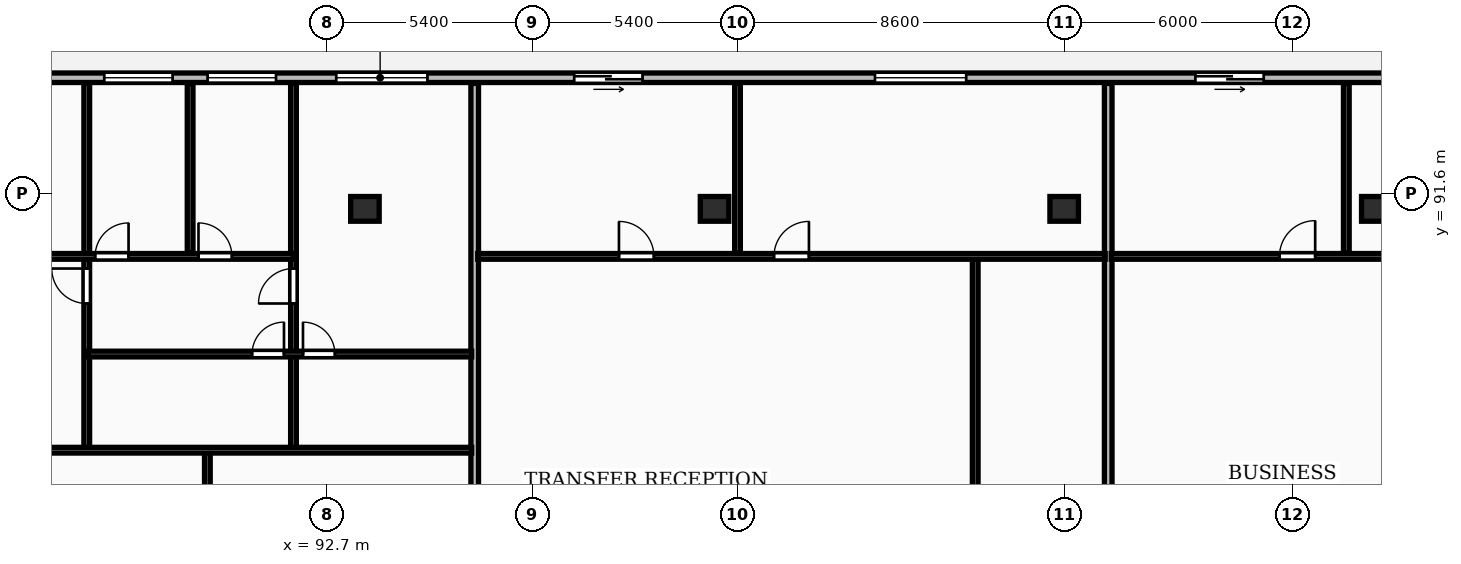
"""IFC4 building model, lengths in metres.
Left out: names, types, materials, properties, quantities, classifications, styles, units other than length and angle.
Written with IfcOpenShell. Run it as: python <this file> out.ifc"""

import sys

from ifc_helpers import new_model, si_unit, direction, frame, frame_2d, origin, origin_2d, place, context, subcontext, project, spatial, rectangle, extrude, element, fill, save


model = new_model("IFC4")
c1 = context("Model", 3, precision=1e-05, world=origin(), true_north=direction((0.0, 1.0)))
c2 = subcontext(c1, "Body", "Model", "MODEL_VIEW")
j1 = project(units=[si_unit("LENGTHUNIT", "METRE"), si_unit("PLANEANGLEUNIT", "RADIAN")], contexts=[c1])
p1 = place(None, origin())
s1 = spatial("IfcSite", under=j1, at=p1, CompositionType="ELEMENT")
p2 = place(p1, origin())
s2 = spatial("IfcBuilding", under=s1, at=p2, CompositionType="ELEMENT")
p3 = place(p2, frame((0.0, 0.0, 256.25)))
s3 = spatial("IfcBuildingStorey", under=s2, at=p3, CompositionType="ELEMENT", Elevation=256.25)
for number, where, z_axis, x_axis in (
    (1, (93.7, 91.2, 0.0), (0.0, 0.0, 1.0), (1.0, 0.0, 0.0)),
    (2, (102.9, 91.2, 0.0), (0.0, 0.0, 1.0), (1.0, 0.0, 0.0)),
    (3, (112.1, 91.2, 0.0), (0.0, 0.0, 1.0), (1.0, 0.0, 0.0)),
    (4, (120.3, 91.2, 0.0), (0.0, 0.0, 1.0), (1.0, 0.0, 0.0)),
):
    element("IfcColumn", number, at=place(p3, frame(where, z_axis=z_axis, x_axis=x_axis)), inside=s3, PredefinedType="COLUMN", context=c2, shape_type="SweptSolid", body=[
        extrude(rectangle(XDim=0.75, YDim=0.65, at=origin_2d()), origin(), (0.0, 0.0, 1.0), 3.45),
    ])
p4 = place(p3, frame((128.4, 94.65, 0.0), z_axis=(0.0, 0.0, 1.0), x_axis=(-1.0, 0.0, 0.0)))
e5 = element("IfcWall", 5, at=p4, inside=s3, PredefinedType="STANDARD", context=c2, shape_type="SweptSolid", body=[
    extrude(rectangle(XDim=68.6, YDim=0.25, at=frame_2d((34.3, 0.0))), origin(), (0.0, 0.0, 1.0), 3.17),
])
p5 = place(p4, frame((60.248, 0.0, 0.85)))
e6 = element("IfcOpeningElement", 6, at=p5, cuts=e5, PredefinedType="OPENING", context=c2, shape_type="SweptSolid", body=[
    extrude(rectangle(XDim=2.4, YDim=1.9, at=frame_2d((1.2, 0.95))), frame((0.0, 0.135, 0.0), z_axis=(0.0, -1.0, 0.0), x_axis=(1.0, 0.0, 0.0)), (0.0, 0.0, 1.0), 0.27),
])
p6 = place(p4, frame((55.523, 0.0, 0.85)))
e7 = element("IfcOpeningElement", 7, at=p6, cuts=e5, PredefinedType="OPENING", context=c2, shape_type="SweptSolid", body=[
    extrude(rectangle(XDim=2.4, YDim=1.9, at=frame_2d((1.2, 0.95))), frame((0.0, 0.135, 0.0), z_axis=(0.0, -1.0, 0.0), x_axis=(1.0, 0.0, 0.0)), (0.0, 0.0, 1.0), 0.27),
])
p7 = place(p4, frame((65.245, 0.0, 0.0)))
e8 = element("IfcOpeningElement", 8, at=p7, cuts=e5, PredefinedType="OPENING", context=c2, shape_type="SweptSolid", body=[
    extrude(rectangle(XDim=1.8, YDim=2.2, at=frame_2d((0.9, 1.1))), frame((0.0, 0.135, 0.0), z_axis=(0.0, -1.0, 0.0), x_axis=(1.0, 0.0, 0.0)), (0.0, 0.0, 1.0), 0.27),
])
p8 = place(p4, frame((50.836, 0.0, 0.85)))
e9 = element("IfcOpeningElement", 9, at=p8, cuts=e5, PredefinedType="OPENING", context=c2, shape_type="SweptSolid", body=[
    extrude(rectangle(XDim=2.4, YDim=1.9, at=frame_2d((1.2, 0.95))), frame((0.0, 0.135, 0.0), z_axis=(0.0, -1.0, 0.0), x_axis=(1.0, 0.0, 0.0)), (0.0, 0.0, 1.0), 0.27),
])
p9 = place(p4, frame((39.76, 0.0, 0.85)))
e10 = element("IfcOpeningElement", 10, at=p9, cuts=e5, PredefinedType="OPENING", context=c2, shape_type="SweptSolid", body=[
    extrude(rectangle(XDim=1.8, YDim=1.8, at=frame_2d((0.9, 0.9))), frame((0.0, 0.135, 0.0), z_axis=(0.0, -1.0, 0.0), x_axis=(1.0, 0.0, 0.0)), (0.0, 0.0, 1.0), 0.27),
])
p10 = place(p4, frame((37.04, 0.0, 0.85)))
e11 = element("IfcOpeningElement", 11, at=p10, cuts=e5, PredefinedType="OPENING", context=c2, shape_type="SweptSolid", body=[
    extrude(rectangle(XDim=1.8, YDim=1.8, at=frame_2d((0.9, 0.9))), frame((0.0, 0.135, 0.0), z_axis=(0.0, -1.0, 0.0), x_axis=(1.0, 0.0, 0.0)), (0.0, 0.0, 1.0), 0.27),
])
p11 = place(p4, frame((44.845, 0.0, 0.0)))
e12 = element("IfcOpeningElement", 12, at=p11, cuts=e5, PredefinedType="OPENING", context=c2, shape_type="SweptSolid", body=[
    extrude(rectangle(XDim=1.8, YDim=2.2, at=frame_2d((0.9, 1.1))), frame((0.0, 0.135, 0.0), z_axis=(0.0, -1.0, 0.0), x_axis=(1.0, 0.0, 0.0)), (0.0, 0.0, 1.0), 0.27),
])
p12 = place(p4, frame((33.056, 0.0, 0.85)))
e13 = element("IfcOpeningElement", 13, at=p12, cuts=e5, PredefinedType="OPENING", context=c2, shape_type="SweptSolid", body=[
    extrude(rectangle(XDim=2.4, YDim=1.9, at=frame_2d((1.2, 0.95))), frame((0.0, 0.135, 0.0), z_axis=(0.0, -1.0, 0.0), x_axis=(1.0, 0.0, 0.0)), (0.0, 0.0, 1.0), 0.27),
])
p13 = place(p4, frame((27.394, 0.0, 0.0)))
e14 = element("IfcOpeningElement", 14, at=p13, cuts=e5, PredefinedType="OPENING", context=c2, shape_type="SweptSolid", body=[
    extrude(rectangle(XDim=1.8, YDim=2.2, at=frame_2d((0.9, 1.1))), frame((0.0, 0.135, 0.0), z_axis=(0.0, -1.0, 0.0), x_axis=(1.0, 0.0, 0.0)), (0.0, 0.0, 1.0), 0.27),
])
p14 = place(p4, frame((18.879, 0.0, 0.85)))
e15 = element("IfcOpeningElement", 15, at=p14, cuts=e5, PredefinedType="OPENING", context=c2, shape_type="SweptSolid", body=[
    extrude(rectangle(XDim=2.4, YDim=1.9, at=frame_2d((1.2, 0.95))), frame((0.0, 0.135, 0.0), z_axis=(0.0, -1.0, 0.0), x_axis=(1.0, 0.0, 0.0)), (0.0, 0.0, 1.0), 0.27),
])
p15 = place(p4, frame((11.048, 0.0, 0.0)))
e16 = element("IfcOpeningElement", 16, at=p15, cuts=e5, PredefinedType="OPENING", context=c2, shape_type="SweptSolid", body=[
    extrude(rectangle(XDim=1.8, YDim=2.2, at=frame_2d((0.9, 1.1))), frame((0.0, 0.135, 0.0), z_axis=(0.0, -1.0, 0.0), x_axis=(1.0, 0.0, 0.0)), (0.0, 0.0, 1.0), 0.27),
])
p16 = place(p4, frame((3.298, 0.0, 0.85)))
e17 = element("IfcOpeningElement", 17, at=p16, cuts=e5, PredefinedType="OPENING", context=c2, shape_type="SweptSolid", body=[
    extrude(rectangle(XDim=2.4, YDim=1.9, at=frame_2d((1.2, 0.95))), frame((0.0, 0.135, 0.0), z_axis=(0.0, -1.0, 0.0), x_axis=(1.0, 0.0, 0.0)), (0.0, 0.0, 1.0), 0.27),
])
p17 = place(p3, frame((96.589, 70.18, 0.0), z_axis=(0.0, 0.0, 1.0), x_axis=(0.0, 1.0, 0.0)))
e18 = element("IfcWall", 18, at=p17, inside=s3, PredefinedType="PARTITIONING", context=c2, shape_type="SweptSolid", body=[
    extrude(rectangle(XDim=24.32, YDim=0.2, at=frame_2d((12.16, 0.0))), origin(), (0.0, 0.0, 1.0), 3.17),
])
p18 = place(p3, frame((89.554, 70.16, 0.0), z_axis=(0.0, 0.0, 1.0), x_axis=(0.0, 1.0, 0.0)))
e19 = element("IfcWall", 19, at=p18, inside=s3, PredefinedType="PARTITIONING", context=c2, shape_type="SweptSolid", body=[
    extrude(rectangle(XDim=14.65, YDim=0.15, at=frame_2d((7.325, 0.0))), origin(), (0.0, 0.0, 1.0), 3.17),
])
p19 = place(p18, frame((6.415, 0.0, 0.0)))
e20 = element("IfcOpeningElement", 20, at=p19, cuts=e19, PredefinedType="OPENING", context=c2, shape_type="SweptSolid", body=[
    extrude(rectangle(XDim=0.84, YDim=2.04, at=frame_2d((0.42, 1.02))), frame((0.0, 0.085, 0.0), z_axis=(0.0, -1.0, 0.0), x_axis=(1.0, 0.0, 0.0)), (0.0, 0.0, 1.0), 0.17),
])
p20 = place(p18, frame((7.755, 0.0, 0.0)))
e21 = element("IfcOpeningElement", 21, at=p20, cuts=e19, PredefinedType="OPENING", context=c2, shape_type="SweptSolid", body=[
    extrude(rectangle(XDim=0.88, YDim=2.06, at=frame_2d((0.44, 1.03))), frame((0.0, 0.085, 0.0), z_axis=(0.0, -1.0, 0.0), x_axis=(1.0, 0.0, 0.0)), (0.0, 0.0, 1.0), 0.17),
])
p21 = place(p3, frame((89.1, 90.03, 0.0), z_axis=(0.0, 0.0, 1.0), x_axis=(0.0, 1.0, 0.0)))
e22 = element("IfcWall", 22, at=p21, inside=s3, PredefinedType="PARTITIONING", context=c2, shape_type="SweptSolid", body=[
    extrude(rectangle(XDim=4.47, YDim=0.15, at=frame_2d((2.235, 0.0))), origin(), (0.0, 0.0, 1.0), 3.17),
])
p22 = place(p3, frame((86.38, 84.89, 0.0), z_axis=(0.0, 0.0, 1.0), x_axis=(0.0, 1.0, 0.0)))
e23 = element("IfcWall", 23, at=p22, inside=s3, PredefinedType="PARTITIONING", context=c2, shape_type="SweptSolid", body=[
    extrude(rectangle(XDim=9.61, YDim=0.15, at=frame_2d((4.805, 0.0))), origin(), (0.0, 0.0, 1.0), 3.17),
])
p23 = place(p22, frame((3.82, 0.0, 0.0)))
e24 = element("IfcOpeningElement", 24, at=p23, cuts=e23, PredefinedType="OPENING", context=c2, shape_type="SweptSolid", body=[
    extrude(rectangle(XDim=0.92, YDim=2.08, at=frame_2d((0.46, 1.04))), frame((0.0, 0.085, 0.0), z_axis=(0.0, -1.0, 0.0), x_axis=(1.0, 0.0, 0.0)), (0.0, 0.0, 1.0), 0.17),
])
p24 = place(p3, frame((91.82, 84.89, 0.0), z_axis=(0.0, 0.0, 1.0), x_axis=(0.0, 1.0, 0.0)))
e25 = element("IfcWall", 25, at=p24, inside=s3, PredefinedType="PARTITIONING", context=c2, shape_type="SweptSolid", body=[
    extrude(rectangle(XDim=2.47, YDim=0.15, at=frame_2d((1.235, 0.0))), origin(), (0.0, 0.0, 1.0), 3.17),
])
p25 = place(p3, frame((91.82, 87.4, 0.0), z_axis=(0.0, 0.0, 1.0), x_axis=(0.0, 1.0, 0.0)))
e26 = element("IfcWall", 26, at=p25, inside=s3, PredefinedType="PARTITIONING", context=c2, shape_type="SweptSolid", body=[
    extrude(rectangle(XDim=7.1, YDim=0.15, at=frame_2d((3.55, 0.0))), origin(), (0.0, 0.0, 1.0), 3.17),
])
p26 = place(p25, frame((1.31, 0.0, 0.0)))
e27 = element("IfcOpeningElement", 27, at=p26, cuts=e26, PredefinedType="OPENING", context=c2, shape_type="SweptSolid", body=[
    extrude(rectangle(XDim=0.92, YDim=2.08, at=frame_2d((0.46, 1.04))), frame((0.0, 0.085, 0.0), z_axis=(0.0, -1.0, 0.0), x_axis=(1.0, 0.0, 0.0)), (0.0, 0.0, 1.0), 0.17),
])
p27 = place(p3, frame((86.42, 87.38, 0.0), z_axis=(0.0, 0.0, 1.0), x_axis=(1.0, 0.0, 0.0)))
e28 = element("IfcWall", 28, at=p27, inside=s3, PredefinedType="PARTITIONING", context=c2, shape_type="SweptSolid", body=[
    extrude(rectangle(XDim=10.089, YDim=0.15, at=frame_2d((5.044, 0.0))), origin(), (0.0, 0.0, 1.0), 3.17),
])
p28 = place(p27, frame((4.31, 0.0, 0.0)))
e29 = element("IfcOpeningElement", 29, at=p28, cuts=e28, PredefinedType="OPENING", context=c2, shape_type="SweptSolid", body=[
    extrude(rectangle(XDim=0.84, YDim=2.04, at=frame_2d((0.42, 1.02))), frame((0.0, 0.085, 0.0), z_axis=(0.0, -1.0, 0.0), x_axis=(1.0, 0.0, 0.0)), (0.0, 0.0, 1.0), 0.17),
])
p29 = place(p27, frame((5.65, 0.0, 0.0)))
e30 = element("IfcOpeningElement", 30, at=p29, cuts=e28, PredefinedType="OPENING", context=c2, shape_type="SweptSolid", body=[
    extrude(rectangle(XDim=0.84, YDim=2.04, at=frame_2d((0.42, 1.02))), frame((0.0, 0.085, 0.0), z_axis=(0.0, -1.0, 0.0), x_axis=(1.0, 0.0, 0.0)), (0.0, 0.0, 1.0), 0.17),
])
p30 = place(p3, frame((78.889, 84.85, 0.0), z_axis=(0.0, 0.0, 1.0), x_axis=(1.0, 0.0, 0.0)))
e31 = element("IfcWall", 31, at=p30, inside=s3, PredefinedType="PARTITIONING", context=c2, shape_type="SweptSolid", body=[
    extrude(rectangle(XDim=17.619, YDim=0.15, at=frame_2d((8.81, 0.0))), origin(), (0.0, 0.0, 1.0), 3.17),
])
p31 = place(p30, frame((2.72, 0.0, 0.0)))
e32 = element("IfcOpeningElement", 32, at=p31, cuts=e31, PredefinedType="OPENING", context=c2, shape_type="SweptSolid", body=[
    extrude(rectangle(XDim=0.92, YDim=2.08, at=frame_2d((0.46, 1.04))), frame((0.0, 0.085, 0.0), z_axis=(0.0, -1.0, 0.0), x_axis=(1.0, 0.0, 0.0)), (0.0, 0.0, 1.0), 0.17),
])
p32 = place(p3, frame((78.889, 89.95, 0.0), z_axis=(0.0, 0.0, 1.0), x_axis=(1.0, 0.0, 0.0)))
e33 = element("IfcWall", 33, at=p32, inside=s3, PredefinedType="PARTITIONING", context=c2, shape_type="SweptSolid", body=[
    extrude(rectangle(XDim=12.931, YDim=0.15, at=frame_2d((6.465, 0.0))), origin(), (0.0, 0.0, 1.0), 3.17),
])
p33 = place(p32, frame((3.033, 0.0, 0.0)))
e34 = element("IfcOpeningElement", 34, at=p33, cuts=e33, PredefinedType="OPENING", context=c2, shape_type="SweptSolid", body=[
    extrude(rectangle(XDim=0.94, YDim=2.1, at=frame_2d((0.47, 1.05))), frame((0.0, 0.085, 0.0), z_axis=(0.0, -1.0, 0.0), x_axis=(1.0, 0.0, 0.0)), (0.0, 0.0, 1.0), 0.17),
])
p34 = place(p32, frame((7.711, 0.0, 0.0)))
e35 = element("IfcOpeningElement", 35, at=p34, cuts=e33, PredefinedType="OPENING", context=c2, shape_type="SweptSolid", body=[
    extrude(rectangle(XDim=0.88, YDim=2.06, at=frame_2d((0.44, 1.03))), frame((0.0, 0.085, 0.0), z_axis=(0.0, -1.0, 0.0), x_axis=(1.0, 0.0, 0.0)), (0.0, 0.0, 1.0), 0.17),
])
p35 = place(p32, frame((10.431, 0.0, 0.0)))
e36 = element("IfcOpeningElement", 36, at=p35, cuts=e33, PredefinedType="OPENING", context=c2, shape_type="SweptSolid", body=[
    extrude(rectangle(XDim=0.88, YDim=2.06, at=frame_2d((0.44, 1.03))), frame((0.0, 0.085, 0.0), z_axis=(0.0, -1.0, 0.0), x_axis=(1.0, 0.0, 0.0)), (0.0, 0.0, 1.0), 0.17),
])
p36 = place(p3, frame((113.259, 70.18, 0.0), z_axis=(0.0, 0.0, 1.0), x_axis=(0.0, 1.0, 0.0)))
e37 = element("IfcWall", 37, at=p36, inside=s3, PredefinedType="PARTITIONING", context=c2, shape_type="SweptSolid", body=[
    extrude(rectangle(XDim=24.32, YDim=0.2, at=frame_2d((12.16, 0.0))), origin(), (0.0, 0.0, 1.0), 3.17),
])
p37 = place(p3, frame((109.759, 70.16, 0.0), z_axis=(0.0, 0.0, 1.0), x_axis=(0.0, 1.0, 0.0)))
e38 = element("IfcWall", 38, at=p37, inside=s3, PredefinedType="PARTITIONING", context=c2, shape_type="SweptSolid", body=[
    extrude(rectangle(XDim=19.73, YDim=0.15, at=frame_2d((9.865, 0.0))), origin(), (0.0, 0.0, 1.0), 3.17),
])
p38 = place(p37, frame((2.406, 0.0, 0.0)))
e39 = element("IfcOpeningElement", 39, at=p38, cuts=e38, PredefinedType="OPENING", context=c2, shape_type="SweptSolid", body=[
    extrude(rectangle(XDim=0.96, YDim=2.1, at=frame_2d((0.48, 1.05))), frame((0.0, 0.085, 0.0), z_axis=(0.0, -1.0, 0.0), x_axis=(1.0, 0.0, 0.0)), (0.0, 0.0, 1.0), 0.17),
])
p39 = place(p37, frame((6.133, 0.0, 0.0)))
e40 = element("IfcOpeningElement", 40, at=p39, cuts=e38, PredefinedType="OPENING", context=c2, shape_type="SweptSolid", body=[
    extrude(rectangle(XDim=0.88, YDim=2.06, at=frame_2d((0.44, 1.03))), frame((0.0, 0.085, 0.0), z_axis=(0.0, -1.0, 0.0), x_axis=(1.0, 0.0, 0.0)), (0.0, 0.0, 1.0), 0.17),
])
p40 = place(p37, frame((11.034, 0.0, 0.0)))
e41 = element("IfcOpeningElement", 41, at=p40, cuts=e38, PredefinedType="OPENING", context=c2, shape_type="SweptSolid", body=[
    extrude(rectangle(XDim=0.84, YDim=2.04, at=frame_2d((0.42, 1.02))), frame((0.0, 0.085, 0.0), z_axis=(0.0, -1.0, 0.0), x_axis=(1.0, 0.0, 0.0)), (0.0, 0.0, 1.0), 0.17),
])
p41 = place(p3, frame((103.504, 90.03, 0.0), z_axis=(0.0, 0.0, 1.0), x_axis=(0.0, 1.0, 0.0)))
e42 = element("IfcWall", 42, at=p41, inside=s3, PredefinedType="PARTITIONING", context=c2, shape_type="SweptSolid", body=[
    extrude(rectangle(XDim=4.47, YDim=0.15, at=frame_2d((2.235, 0.0))), origin(), (0.0, 0.0, 1.0), 3.17),
])
p42 = place(p3, frame((96.669, 89.95, 0.0), z_axis=(0.0, 0.0, 1.0), x_axis=(1.0, 0.0, 0.0)))
e43 = element("IfcWall", 43, at=p42, inside=s3, PredefinedType="PARTITIONING", context=c2, shape_type="SweptSolid", body=[
    extrude(rectangle(XDim=16.51, YDim=0.15, at=frame_2d((8.255, 0.0))), origin(), (0.0, 0.0, 1.0), 3.17),
])
p43 = place(p42, frame((3.716, 0.0, 0.0)))
e44 = element("IfcOpeningElement", 44, at=p43, cuts=e43, PredefinedType="OPENING", context=c2, shape_type="SweptSolid", body=[
    extrude(rectangle(XDim=0.92, YDim=2.08, at=frame_2d((0.46, 1.04))), frame((0.0, 0.085, 0.0), z_axis=(0.0, -1.0, 0.0), x_axis=(1.0, 0.0, 0.0)), (0.0, 0.0, 1.0), 0.17),
])
p44 = place(p42, frame((7.795, 0.0, 0.0)))
e45 = element("IfcOpeningElement", 45, at=p44, cuts=e43, PredefinedType="OPENING", context=c2, shape_type="SweptSolid", body=[
    extrude(rectangle(XDim=0.92, YDim=2.08, at=frame_2d((0.46, 1.04))), frame((0.0, 0.085, 0.0), z_axis=(0.0, -1.0, 0.0), x_axis=(1.0, 0.0, 0.0)), (0.0, 0.0, 1.0), 0.17),
])
p45 = place(p3, frame((119.524, 90.03, 0.0), z_axis=(0.0, 0.0, 1.0), x_axis=(0.0, 1.0, 0.0)))
e46 = element("IfcWall", 46, at=p45, inside=s3, PredefinedType="PARTITIONING", context=c2, shape_type="SweptSolid", body=[
    extrude(rectangle(XDim=4.47, YDim=0.15, at=frame_2d((2.235, 0.0))), origin(), (0.0, 0.0, 1.0), 3.17),
])
p46 = place(p3, frame((113.339, 89.95, 0.0), z_axis=(0.0, 0.0, 1.0), x_axis=(1.0, 0.0, 0.0)))
e47 = element("IfcWall", 47, at=p46, inside=s3, PredefinedType="PARTITIONING", context=c2, shape_type="SweptSolid", body=[
    extrude(rectangle(XDim=14.981, YDim=0.15, at=frame_2d((7.49, 0.0))), origin(), (0.0, 0.0, 1.0), 3.17),
])
p47 = place(p46, frame((4.426, 0.0, 0.0)))
e48 = element("IfcOpeningElement", 48, at=p47, cuts=e47, PredefinedType="OPENING", context=c2, shape_type="SweptSolid", body=[
    extrude(rectangle(XDim=0.94, YDim=2.1, at=frame_2d((0.47, 1.05))), frame((0.0, 0.085, 0.0), z_axis=(0.0, -1.0, 0.0), x_axis=(1.0, 0.0, 0.0)), (0.0, 0.0, 1.0), 0.17),
])
p48 = place(p46, frame((8.518, 0.0, 0.0)))
e49 = element("IfcOpeningElement", 49, at=p48, cuts=e47, PredefinedType="OPENING", context=c2, shape_type="SweptSolid", body=[
    extrude(rectangle(XDim=0.94, YDim=2.1, at=frame_2d((0.47, 1.05))), frame((0.0, 0.085, 0.0), z_axis=(0.0, -1.0, 0.0), x_axis=(1.0, 0.0, 0.0)), (0.0, 0.0, 1.0), 0.17),
])
p49 = place(p9, origin())
e50 = element("IfcWindow", 50, at=p49, inside=s3, PartitioningType="SINGLE_PANEL", PredefinedType="WINDOW", context=c2, shape_type="SweptSolid", body=[
    extrude(rectangle(XDim=1.8, YDim=1.8, at=frame_2d((0.9, 0.9))), frame((0.0, 0.03, 0.0), z_axis=(0.0, -1.0, 0.0), x_axis=(1.0, 0.0, 0.0)), (0.0, 0.0, 1.0), 0.06),
])
fill(e10, e50)
p50 = place(p10, origin())
e51 = element("IfcWindow", 51, at=p50, inside=s3, PartitioningType="SINGLE_PANEL", PredefinedType="WINDOW", context=c2, shape_type="SweptSolid", body=[
    extrude(rectangle(XDim=1.8, YDim=1.8, at=frame_2d((0.9, 0.9))), frame((0.0, 0.03, 0.0), z_axis=(0.0, -1.0, 0.0), x_axis=(1.0, 0.0, 0.0)), (0.0, 0.0, 1.0), 0.06),
])
fill(e11, e51)
p51 = place(p12, origin())
e52 = element("IfcWindow", 52, at=p51, inside=s3, PartitioningType="DOUBLE_PANEL_VERTICAL", PredefinedType="WINDOW", context=c2, shape_type="SweptSolid", body=[
    extrude(rectangle(XDim=2.4, YDim=1.9, at=frame_2d((1.2, 0.95))), frame((0.0, 0.03, 0.0), z_axis=(0.0, -1.0, 0.0), x_axis=(1.0, 0.0, 0.0)), (0.0, 0.0, 1.0), 0.06),
])
fill(e13, e52)
p52 = place(p13, origin())
e53 = element("IfcDoor", 53, at=p52, inside=s3, OperationType="SLIDING_TO_LEFT", PredefinedType="DOOR", context=c2, shape_type="SweptSolid", body=[
    extrude(rectangle(XDim=1.8, YDim=2.2, at=frame_2d((0.9, 1.1))), frame((0.0, 0.025, 0.0), z_axis=(0.0, -1.0, 0.0), x_axis=(1.0, 0.0, 0.0)), (0.0, 0.0, 1.0), 0.05),
])
fill(e14, e53)
p53 = place(p14, origin())
e54 = element("IfcWindow", 54, at=p53, inside=s3, PartitioningType="DOUBLE_PANEL_VERTICAL", PredefinedType="WINDOW", context=c2, shape_type="SweptSolid", body=[
    extrude(rectangle(XDim=2.4, YDim=1.9, at=frame_2d((1.2, 0.95))), frame((0.0, 0.03, 0.0), z_axis=(0.0, -1.0, 0.0), x_axis=(1.0, 0.0, 0.0)), (0.0, 0.0, 1.0), 0.06),
])
fill(e15, e54)
p54 = place(p15, origin())
e55 = element("IfcDoor", 55, at=p54, inside=s3, OperationType="SLIDING_TO_LEFT", PredefinedType="DOOR", context=c2, shape_type="SweptSolid", body=[
    extrude(rectangle(XDim=1.8, YDim=2.2, at=frame_2d((0.9, 1.1))), frame((0.0, 0.025, 0.0), z_axis=(0.0, -1.0, 0.0), x_axis=(1.0, 0.0, 0.0)), (0.0, 0.0, 1.0), 0.05),
])
fill(e16, e55)
p55 = place(p23, origin())
e56 = element("IfcDoor", 56, at=p55, inside=s3, OperationType="SINGLE_SWING_RIGHT", PredefinedType="DOOR", context=c2, shape_type="SweptSolid", body=[
    extrude(rectangle(XDim=0.92, YDim=2.08, at=frame_2d((0.46, 1.04))), frame((0.0, 0.025, 0.0), z_axis=(0.0, -1.0, 0.0), x_axis=(1.0, 0.0, 0.0)), (0.0, 0.0, 1.0), 0.05),
])
fill(e24, e56)
p56 = place(p26, origin())
e57 = element("IfcDoor", 57, at=p56, inside=s3, OperationType="SINGLE_SWING_LEFT", PredefinedType="DOOR", context=c2, shape_type="SweptSolid", body=[
    extrude(rectangle(XDim=0.92, YDim=2.08, at=frame_2d((0.46, 1.04))), frame((0.0, 0.025, 0.0), z_axis=(0.0, -1.0, 0.0), x_axis=(1.0, 0.0, 0.0)), (0.0, 0.0, 1.0), 0.05),
])
fill(e27, e57)
p57 = place(p28, origin())
e58 = element("IfcDoor", 58, at=p57, inside=s3, OperationType="SINGLE_SWING_RIGHT", PredefinedType="DOOR", context=c2, shape_type="SweptSolid", body=[
    extrude(rectangle(XDim=0.84, YDim=2.04, at=frame_2d((0.42, 1.02))), frame((0.0, 0.025, 0.0), z_axis=(0.0, -1.0, 0.0), x_axis=(1.0, 0.0, 0.0)), (0.0, 0.0, 1.0), 0.05),
])
fill(e29, e58)
p58 = place(p29, origin())
e59 = element("IfcDoor", 59, at=p58, inside=s3, OperationType="SINGLE_SWING_LEFT", PredefinedType="DOOR", context=c2, shape_type="SweptSolid", body=[
    extrude(rectangle(XDim=0.84, YDim=2.04, at=frame_2d((0.42, 1.02))), frame((0.0, 0.025, 0.0), z_axis=(0.0, -1.0, 0.0), x_axis=(1.0, 0.0, 0.0)), (0.0, 0.0, 1.0), 0.05),
])
fill(e30, e59)
p59 = place(p34, origin())
e60 = element("IfcDoor", 60, at=p59, inside=s3, OperationType="SINGLE_SWING_RIGHT", PredefinedType="DOOR", context=c2, shape_type="SweptSolid", body=[
    extrude(rectangle(XDim=0.88, YDim=2.06, at=frame_2d((0.44, 1.03))), frame((0.0, 0.025, 0.0), z_axis=(0.0, -1.0, 0.0), x_axis=(1.0, 0.0, 0.0)), (0.0, 0.0, 1.0), 0.05),
])
fill(e35, e60)
p60 = place(p35, origin())
e61 = element("IfcDoor", 61, at=p60, inside=s3, OperationType="SINGLE_SWING_LEFT", PredefinedType="DOOR", context=c2, shape_type="SweptSolid", body=[
    extrude(rectangle(XDim=0.88, YDim=2.06, at=frame_2d((0.44, 1.03))), frame((0.0, 0.025, 0.0), z_axis=(0.0, -1.0, 0.0), x_axis=(1.0, 0.0, 0.0)), (0.0, 0.0, 1.0), 0.05),
])
fill(e36, e61)
p61 = place(p43, origin())
e62 = element("IfcDoor", 62, at=p61, inside=s3, OperationType="SINGLE_SWING_LEFT", PredefinedType="DOOR", context=c2, shape_type="SweptSolid", body=[
    extrude(rectangle(XDim=0.92, YDim=2.08, at=frame_2d((0.46, 1.04))), frame((0.0, 0.025, 0.0), z_axis=(0.0, -1.0, 0.0), x_axis=(1.0, 0.0, 0.0)), (0.0, 0.0, 1.0), 0.05),
])
fill(e44, e62)
p62 = place(p44, origin())
e63 = element("IfcDoor", 63, at=p62, inside=s3, OperationType="SINGLE_SWING_RIGHT", PredefinedType="DOOR", context=c2, shape_type="SweptSolid", body=[
    extrude(rectangle(XDim=0.92, YDim=2.08, at=frame_2d((0.46, 1.04))), frame((0.0, 0.025, 0.0), z_axis=(0.0, -1.0, 0.0), x_axis=(1.0, 0.0, 0.0)), (0.0, 0.0, 1.0), 0.05),
])
fill(e45, e63)
p63 = place(p47, origin())
e64 = element("IfcDoor", 64, at=p63, inside=s3, OperationType="SINGLE_SWING_RIGHT", PredefinedType="DOOR", context=c2, shape_type="SweptSolid", body=[
    extrude(rectangle(XDim=0.94, YDim=2.1, at=frame_2d((0.47, 1.05))), frame((0.0, 0.025, 0.0), z_axis=(0.0, -1.0, 0.0), x_axis=(1.0, 0.0, 0.0)), (0.0, 0.0, 1.0), 0.05),
])
fill(e48, e64)
save(model, sys.argv[1])
